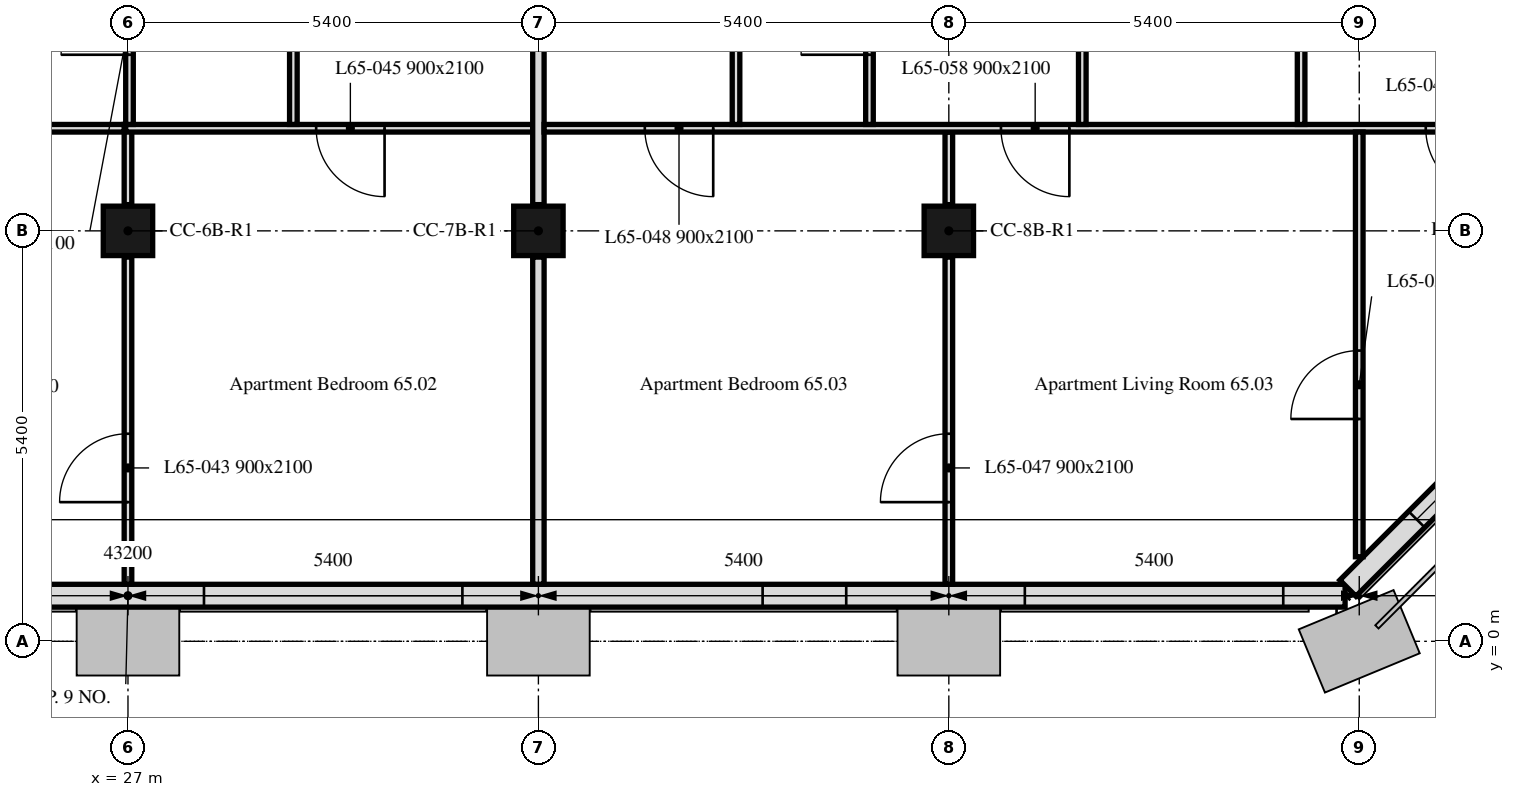
"""IFC4 building model, lengths in metres.
Left out: names, types, materials, properties, quantities, classifications, styles, units other than length and angle.
Written with IfcOpenShell. Run it as: python <this file> out.ifc"""

import sys

from ifc_helpers import new_model, si_unit, direction, frame, frame_2d, origin, origin_2d, place, context, subcontext, project, spatial, rectangle, extrude, element, fill, save


model = new_model("IFC4")
c1 = context("Model", 3, precision=1e-05, world=origin(), true_north=direction((0.0, 1.0)))
c2 = subcontext(c1, "Body", "Model", "MODEL_VIEW")
j1 = project(units=[si_unit("LENGTHUNIT", "METRE"), si_unit("PLANEANGLEUNIT", "RADIAN")], contexts=[c1])
p1 = place(None, origin())
s1 = spatial("IfcSite", under=j1, at=p1, CompositionType="ELEMENT")
p2 = place(p1, origin())
s2 = spatial("IfcBuilding", under=s1, at=p2, CompositionType="ELEMENT")
p3 = place(p2, frame((0.0, 0.0, 268.6)))
s3 = spatial("IfcBuildingStorey", under=s2, at=p3, CompositionType="ELEMENT", Elevation=268.6)
for number, where, z_axis, x_axis in (
    (1, (27.0, 5.4, 0.0), (0.0, 0.0, 1.0), (1.0, 0.0, 0.0)),
    (2, (32.4, 5.4, 0.0), (0.0, 0.0, 1.0), (1.0, 0.0, 0.0)),
    (3, (37.8, 5.4, 0.0), (0.0, 0.0, 1.0), (1.0, 0.0, 0.0)),
):
    element("IfcColumn", number, at=place(p3, frame(where, z_axis=z_axis, x_axis=x_axis)), inside=s3, PredefinedType="COLUMN", context=c2, shape_type="SweptSolid", body=[
        extrude(rectangle(XDim=0.65, YDim=0.65, at=origin_2d()), origin(), (0.0, 0.0, 1.0), 3.0),
    ])
p4 = place(p3, frame((10.986, 0.6, 0.0), z_axis=(0.0, 0.0, 1.0), x_axis=(1.0, 0.0, 0.0)))
e4 = element("IfcWall", 4, at=p4, inside=s3, PredefinedType="SOLIDWALL", context=c2, shape_type="SweptSolid", body=[
    extrude(rectangle(XDim=32.027, YDim=0.3, at=frame_2d((16.014, 0.0))), origin(), (0.0, 0.0, 1.0), 3.0),
])
p5 = place(p4, frame((2.764, 0.0, 0.9)))
e5 = element("IfcOpeningElement", 5, at=p5, cuts=e4, PredefinedType="OPENING", context=c2, shape_type="SweptSolid", body=[
    extrude(rectangle(XDim=1.1, YDim=1.7, at=frame_2d((0.55, 0.85))), frame((0.0, 0.16, 0.0), z_axis=(0.0, -1.0, 0.0), x_axis=(1.0, 0.0, 0.0)), (0.0, 0.0, 1.0), 0.32),
])
p6 = place(p4, frame((6.214, 0.0, 0.9)))
e6 = element("IfcOpeningElement", 6, at=p6, cuts=e4, PredefinedType="OPENING", context=c2, shape_type="SweptSolid", body=[
    extrude(rectangle(XDim=3.4, YDim=1.7, at=frame_2d((1.7, 0.85))), frame((0.0, 0.16, 0.0), z_axis=(0.0, -1.0, 0.0), x_axis=(1.0, 0.0, 0.0)), (0.0, 0.0, 1.0), 0.32),
])
p7 = place(p4, frame((13.564, 0.0, 0.9)))
e7 = element("IfcOpeningElement", 7, at=p7, cuts=e4, PredefinedType="OPENING", context=c2, shape_type="SweptSolid", body=[
    extrude(rectangle(XDim=1.1, YDim=1.7, at=frame_2d((0.55, 0.85))), frame((0.0, 0.16, 0.0), z_axis=(0.0, -1.0, 0.0), x_axis=(1.0, 0.0, 0.0)), (0.0, 0.0, 1.0), 0.32),
])
p8 = place(p4, frame((17.014, 0.0, 0.9)))
e8 = element("IfcOpeningElement", 8, at=p8, cuts=e4, PredefinedType="OPENING", context=c2, shape_type="SweptSolid", body=[
    extrude(rectangle(XDim=3.4, YDim=1.7, at=frame_2d((1.7, 0.85))), frame((0.0, 0.16, 0.0), z_axis=(0.0, -1.0, 0.0), x_axis=(1.0, 0.0, 0.0)), (0.0, 0.0, 1.0), 0.32),
])
p9 = place(p4, frame((24.364, 0.0, 0.9)))
e9 = element("IfcOpeningElement", 9, at=p9, cuts=e4, PredefinedType="OPENING", context=c2, shape_type="SweptSolid", body=[
    extrude(rectangle(XDim=1.1, YDim=1.7, at=frame_2d((0.55, 0.85))), frame((0.0, 0.16, 0.0), z_axis=(0.0, -1.0, 0.0), x_axis=(1.0, 0.0, 0.0)), (0.0, 0.0, 1.0), 0.32),
])
p10 = place(p4, frame((27.814, 0.0, 0.9)))
e10 = element("IfcOpeningElement", 10, at=p10, cuts=e4, PredefinedType="OPENING", context=c2, shape_type="SweptSolid", body=[
    extrude(rectangle(XDim=3.4, YDim=1.7, at=frame_2d((1.7, 0.85))), frame((0.0, 0.16, 0.0), z_axis=(0.0, -1.0, 0.0), x_axis=(1.0, 0.0, 0.0)), (0.0, 0.0, 1.0), 0.32),
])
p11 = place(p3, frame((43.051, 0.699, 0.0), z_axis=(0.0, 0.0, 1.0), x_axis=(0.707106781187, 0.707106781187, 0.0)))
e11 = element("IfcWall", 11, at=p11, inside=s3, PredefinedType="SOLIDWALL", context=c2, shape_type="SweptSolid", body=[
    extrude(rectangle(XDim=6.86, YDim=0.3, at=frame_2d((3.43, 0.0))), origin(), (0.0, 0.0, 1.0), 3.0),
])
p12 = place(p11, frame((1.28, 0.0, 0.9)))
e12 = element("IfcOpeningElement", 12, at=p12, cuts=e11, PredefinedType="OPENING", context=c2, shape_type="SweptSolid", body=[
    extrude(rectangle(XDim=1.1, YDim=1.7, at=frame_2d((0.55, 0.85))), frame((0.0, 0.16, 0.0), z_axis=(0.0, -1.0, 0.0), x_axis=(1.0, 0.0, 0.0)), (0.0, 0.0, 1.0), 0.32),
])
p13 = place(p11, frame((4.48, 0.0, 0.9)))
e13 = element("IfcOpeningElement", 13, at=p13, cuts=e11, PredefinedType="OPENING", context=c2, shape_type="SweptSolid", body=[
    extrude(rectangle(XDim=1.1, YDim=1.7, at=frame_2d((0.55, 0.85))), frame((0.0, 0.16, 0.0), z_axis=(0.0, -1.0, 0.0), x_axis=(1.0, 0.0, 0.0)), (0.0, 0.0, 1.0), 0.32),
])
p14 = place(p3, frame((27.0, 0.751, 0.0), z_axis=(0.0, 0.0, 1.0), x_axis=(0.0, 1.0, 0.0)))
e14 = element("IfcWall", 14, at=p14, inside=s3, PredefinedType="PARTITIONING", context=c2, shape_type="SweptSolid", body=[
    extrude(rectangle(XDim=4.304, YDim=0.1, at=frame_2d((2.152, 0.0))), origin(), (0.0, 0.0, 1.0), 2.4),
])
p15 = place(p14, frame((1.08, 0.0, 0.0)))
e15 = element("IfcOpeningElement", 15, at=p15, cuts=e14, PredefinedType="OPENING", context=c2, shape_type="SweptSolid", body=[
    extrude(rectangle(XDim=0.9, YDim=2.1, at=frame_2d((0.45, 1.05))), frame((0.0, 0.05, 0.0), z_axis=(0.0, -1.0, 0.0), x_axis=(1.0, 0.0, 0.0)), (0.0, 0.0, 1.0), 0.1),
])
p16 = place(p3, frame((27.0, 5.745, 0.0), z_axis=(0.0, 0.0, 1.0), x_axis=(0.0, 1.0, 0.0)))
e16 = element("IfcWall", 16, at=p16, inside=s3, PredefinedType="PARTITIONING", context=c2, shape_type="SweptSolid", body=[
    extrude(rectangle(XDim=1.055, YDim=0.1, at=frame_2d((0.527, 0.0))), origin(), (0.0, 0.0, 1.0), 2.4),
])
p17 = place(p3, frame((26.95, 6.75, 0.0), z_axis=(0.0, 0.0, 1.0), x_axis=(-1.0, 0.0, 0.0)))
e17 = element("IfcWall", 17, at=p17, inside=s3, PredefinedType="PARTITIONING", context=c2, shape_type="SweptSolid", body=[
    extrude(rectangle(XDim=5.275, YDim=0.1, at=frame_2d((2.637, 0.0))), origin(), (0.0, 0.0, 1.0), 3.0),
])
p18 = place(p17, frame((2.88, 0.0, 0.0)))
e18 = element("IfcOpeningElement", 18, at=p18, cuts=e17, PredefinedType="OPENING", context=c2, shape_type="SweptSolid", body=[
    extrude(rectangle(XDim=0.9, YDim=2.1, at=frame_2d((0.45, 1.05))), frame((0.0, 0.05, 0.0), z_axis=(0.0, -1.0, 0.0), x_axis=(1.0, 0.0, 0.0)), (0.0, 0.0, 1.0), 0.1),
])
p19 = place(p17, frame((1.38, 0.0, 0.0)))
e19 = element("IfcOpeningElement", 19, at=p19, cuts=e17, PredefinedType="OPENING", context=c2, shape_type="SweptSolid", body=[
    extrude(rectangle(XDim=0.9, YDim=2.1, at=frame_2d((0.45, 1.05))), frame((0.0, 0.05, 0.0), z_axis=(0.0, -1.0, 0.0), x_axis=(1.0, 0.0, 0.0)), (0.0, 0.0, 1.0), 0.1),
])
p20 = place(p3, frame((32.4, 0.751, 0.0), z_axis=(0.0, 0.0, 1.0), x_axis=(0.0, 1.0, 0.0)))
e20 = element("IfcWall", 20, at=p20, inside=s3, PredefinedType="PARTITIONING", context=c2, shape_type="SweptSolid", body=[
    extrude(rectangle(XDim=4.304, YDim=0.15, at=frame_2d((2.152, 0.0))), origin(), (0.0, 0.0, 1.0), 2.4),
])
p21 = place(p3, frame((32.325, 6.75, 0.0), z_axis=(0.0, 0.0, 1.0), x_axis=(-1.0, 0.0, 0.0)))
e21 = element("IfcWall", 21, at=p21, inside=s3, PredefinedType="PARTITIONING", context=c2, shape_type="SweptSolid", body=[
    extrude(rectangle(XDim=5.355, YDim=0.1, at=frame_2d((2.677, 0.0))), origin(), (0.0, 0.0, 1.0), 3.0),
])
p22 = place(p21, frame((1.949, 0.0, 0.0)))
e22 = element("IfcOpeningElement", 22, at=p22, cuts=e21, PredefinedType="OPENING", context=c2, shape_type="SweptSolid", body=[
    extrude(rectangle(XDim=0.9, YDim=2.1, at=frame_2d((0.45, 1.05))), frame((0.0, 0.05, 0.0), z_axis=(0.0, -1.0, 0.0), x_axis=(1.0, 0.0, 0.0)), (0.0, 0.0, 1.0), 0.1),
])
p23 = place(p3, frame((27.02, 6.8, 0.0), z_axis=(0.0, 0.0, 1.0), x_axis=(0.0, 1.0, 0.0)))
e23 = element("IfcWall", 23, at=p23, inside=s3, PredefinedType="PARTITIONING", context=c2, shape_type="SweptSolid", body=[
    extrude(rectangle(XDim=3.655, YDim=0.1, at=frame_2d((1.828, 0.0))), origin(), (0.0, 0.0, 1.0), 2.4),
])
p24 = place(p23, frame((0.917, 0.0, 0.0)))
e24 = element("IfcOpeningElement", 24, at=p24, cuts=e23, PredefinedType="OPENING", context=c2, shape_type="SweptSolid", body=[
    extrude(rectangle(XDim=0.9, YDim=2.1, at=frame_2d((0.45, 1.05))), frame((0.0, 0.05, 0.0), z_axis=(0.0, -1.0, 0.0), x_axis=(1.0, 0.0, 0.0)), (0.0, 0.0, 1.0), 0.1),
])
p25 = place(p3, frame((29.176, 6.8, 0.0), z_axis=(0.0, 0.0, 1.0), x_axis=(0.0, 1.0, 0.0)))
e25 = element("IfcWall", 25, at=p25, inside=s3, PredefinedType="PARTITIONING", context=c2, shape_type="SweptSolid", body=[
    extrude(rectangle(XDim=7.075, YDim=0.1, at=frame_2d((3.538, 0.0))), origin(), (0.0, 0.0, 1.0), 3.0),
])
p26 = place(p3, frame((32.4, 5.745, 0.0), z_axis=(0.0, 0.0, 1.0), x_axis=(0.0, 1.0, 0.0)))
e26 = element("IfcWall", 26, at=p26, inside=s3, PredefinedType="PARTITIONING", context=c2, shape_type="SweptSolid", body=[
    extrude(rectangle(XDim=4.71, YDim=0.15, at=frame_2d((2.355, 0.0))), origin(), (0.0, 0.0, 1.0), 2.4),
])
p27 = place(p3, frame((37.8, 0.751, 0.0), z_axis=(0.0, 0.0, 1.0), x_axis=(0.0, 1.0, 0.0)))
e27 = element("IfcWall", 27, at=p27, inside=s3, PredefinedType="PARTITIONING", context=c2, shape_type="SweptSolid", body=[
    extrude(rectangle(XDim=4.304, YDim=0.1, at=frame_2d((2.152, 0.0))), origin(), (0.0, 0.0, 1.0), 2.4),
])
p28 = place(p27, frame((1.08, 0.0, 0.0)))
e28 = element("IfcOpeningElement", 28, at=p28, cuts=e27, PredefinedType="OPENING", context=c2, shape_type="SweptSolid", body=[
    extrude(rectangle(XDim=0.9, YDim=2.1, at=frame_2d((0.45, 1.05))), frame((0.0, 0.05, 0.0), z_axis=(0.0, -1.0, 0.0), x_axis=(1.0, 0.0, 0.0)), (0.0, 0.0, 1.0), 0.1),
])
p29 = place(p3, frame((37.8, 5.745, 0.0), z_axis=(0.0, 0.0, 1.0), x_axis=(0.0, 1.0, 0.0)))
e29 = element("IfcWall", 29, at=p29, inside=s3, PredefinedType="PARTITIONING", context=c2, shape_type="SweptSolid", body=[
    extrude(rectangle(XDim=0.955, YDim=0.1, at=frame_2d((0.478, 0.0))), origin(), (0.0, 0.0, 1.0), 2.4),
])
p30 = place(p3, frame((47.849, 6.75, 0.0), z_axis=(0.0, 0.0, 1.0), x_axis=(-1.0, 0.0, 0.0)))
e30 = element("IfcWall", 30, at=p30, inside=s3, PredefinedType="PARTITIONING", context=c2, shape_type="SweptSolid", body=[
    extrude(rectangle(XDim=15.374, YDim=0.1, at=frame_2d((7.687, 0.0))), origin(), (0.0, 0.0, 1.0), 2.4),
])
p31 = place(p30, frame((0.929, 0.0, 0.0)))
e31 = element("IfcOpeningElement", 31, at=p31, cuts=e30, PredefinedType="OPENING", context=c2, shape_type="SweptSolid", body=[
    extrude(rectangle(XDim=0.9, YDim=2.1, at=frame_2d((0.45, 1.05))), frame((0.0, 0.05, 0.0), z_axis=(0.0, -1.0, 0.0), x_axis=(1.0, 0.0, 0.0)), (0.0, 0.0, 1.0), 0.1),
])
p32 = place(p30, frame((13.149, 0.0, 0.0)))
e32 = element("IfcOpeningElement", 32, at=p32, cuts=e30, PredefinedType="OPENING", context=c2, shape_type="SweptSolid", body=[
    extrude(rectangle(XDim=0.9, YDim=2.1, at=frame_2d((0.45, 1.05))), frame((0.0, 0.05, 0.0), z_axis=(0.0, -1.0, 0.0), x_axis=(1.0, 0.0, 0.0)), (0.0, 0.0, 1.0), 0.1),
])
p33 = place(p30, frame((2.874, 0.0, 0.0)))
e33 = element("IfcOpeningElement", 33, at=p33, cuts=e30, PredefinedType="OPENING", context=c2, shape_type="SweptSolid", body=[
    extrude(rectangle(XDim=0.9, YDim=2.1, at=frame_2d((0.45, 1.05))), frame((0.0, 0.05, 0.0), z_axis=(0.0, -1.0, 0.0), x_axis=(1.0, 0.0, 0.0)), (0.0, 0.0, 1.0), 0.1),
])
p34 = place(p30, frame((8.463, 0.0, 0.0)))
e34 = element("IfcOpeningElement", 34, at=p34, cuts=e30, PredefinedType="OPENING", context=c2, shape_type="SweptSolid", body=[
    extrude(rectangle(XDim=0.9, YDim=2.1, at=frame_2d((0.45, 1.05))), frame((0.0, 0.05, 0.0), z_axis=(0.0, -1.0, 0.0), x_axis=(1.0, 0.0, 0.0)), (0.0, 0.0, 1.0), 0.1),
])
p35 = place(p3, frame((43.2, 1.112, 0.0), z_axis=(0.0, 0.0, 1.0), x_axis=(0.0, 1.0, 0.0)))
e35 = element("IfcWall", 35, at=p35, inside=s3, PredefinedType="PARTITIONING", context=c2, shape_type="SweptSolid", body=[
    extrude(rectangle(XDim=5.588, YDim=0.1, at=frame_2d((2.794, 0.0))), origin(), (0.0, 0.0, 1.0), 3.0),
])
p36 = place(p35, frame((1.813, 0.0, 0.0)))
e36 = element("IfcOpeningElement", 36, at=p36, cuts=e35, PredefinedType="OPENING", context=c2, shape_type="SweptSolid", body=[
    extrude(rectangle(XDim=0.9, YDim=2.1, at=frame_2d((0.45, 1.05))), frame((0.0, 0.05, 0.0), z_axis=(0.0, -1.0, 0.0), x_axis=(1.0, 0.0, 0.0)), (0.0, 0.0, 1.0), 0.1),
])
p37 = place(p3, frame((35.0, 6.8, 0.0), z_axis=(0.0, 0.0, 1.0), x_axis=(0.0, 1.0, 0.0)))
e37 = element("IfcWall", 37, at=p37, inside=s3, PredefinedType="PARTITIONING", context=c2, shape_type="SweptSolid", body=[
    extrude(rectangle(XDim=7.075, YDim=0.1, at=frame_2d((3.538, 0.0))), origin(), (0.0, 0.0, 1.0), 2.4),
])
p38 = place(p3, frame((36.756, 6.8, 0.0), z_axis=(0.0, 0.0, 1.0), x_axis=(0.0, 1.0, 0.0)))
e38 = element("IfcWall", 38, at=p38, inside=s3, PredefinedType="PARTITIONING", context=c2, shape_type="SweptSolid", body=[
    extrude(rectangle(XDim=7.075, YDim=0.1, at=frame_2d((3.538, 0.0))), origin(), (0.0, 0.0, 1.0), 2.4),
])
p39 = place(p38, frame((0.917, 0.0, 0.0)))
e39 = element("IfcOpeningElement", 39, at=p39, cuts=e38, PredefinedType="OPENING", context=c2, shape_type="SweptSolid", body=[
    extrude(rectangle(XDim=0.9, YDim=2.1, at=frame_2d((0.45, 1.05))), frame((0.0, 0.05, 0.0), z_axis=(0.0, -1.0, 0.0), x_axis=(1.0, 0.0, 0.0)), (0.0, 0.0, 1.0), 0.1),
])
p40 = place(p38, frame((5.925, 0.0, 0.0)))
e40 = element("IfcOpeningElement", 40, at=p40, cuts=e38, PredefinedType="OPENING", context=c2, shape_type="SweptSolid", body=[
    extrude(rectangle(XDim=0.9, YDim=2.1, at=frame_2d((0.45, 1.05))), frame((0.0, 0.05, 0.0), z_axis=(0.0, -1.0, 0.0), x_axis=(1.0, 0.0, 0.0)), (0.0, 0.0, 1.0), 0.1),
])
p41 = place(p3, frame((39.556, 6.8, 0.0), z_axis=(0.0, 0.0, 1.0), x_axis=(0.0, 1.0, 0.0)))
e41 = element("IfcWall", 41, at=p41, inside=s3, PredefinedType="PARTITIONING", context=c2, shape_type="SweptSolid", body=[
    extrude(rectangle(XDim=7.075, YDim=0.1, at=frame_2d((3.538, 0.0))), origin(), (0.0, 0.0, 1.0), 2.4),
])
p42 = place(p41, frame((1.05, 0.0, 0.0)))
e42 = element("IfcOpeningElement", 42, at=p42, cuts=e41, PredefinedType="OPENING", context=c2, shape_type="SweptSolid", body=[
    extrude(rectangle(XDim=0.9, YDim=2.1, at=frame_2d((0.45, 1.05))), frame((0.0, 0.05, 0.0), z_axis=(0.0, -1.0, 0.0), x_axis=(1.0, 0.0, 0.0)), (0.0, 0.0, 1.0), 0.1),
])
p43 = place(p41, frame((5.925, 0.0, 0.0)))
e43 = element("IfcOpeningElement", 43, at=p43, cuts=e41, PredefinedType="OPENING", context=c2, shape_type="SweptSolid", body=[
    extrude(rectangle(XDim=0.9, YDim=2.1, at=frame_2d((0.45, 1.05))), frame((0.0, 0.05, 0.0), z_axis=(0.0, -1.0, 0.0), x_axis=(1.0, 0.0, 0.0)), (0.0, 0.0, 1.0), 0.1),
])
p44 = place(p3, frame((42.435, 6.8, 0.0), z_axis=(0.0, 0.0, 1.0), x_axis=(0.0, 1.0, 0.0)))
e44 = element("IfcWall", 44, at=p44, inside=s3, PredefinedType="PARTITIONING", context=c2, shape_type="SweptSolid", body=[
    extrude(rectangle(XDim=7.075, YDim=0.1, at=frame_2d((3.538, 0.0))), origin(), (0.0, 0.0, 1.0), 2.4),
])
p45 = place(p8, origin())
e45 = element("IfcWindow", 45, at=p45, inside=s3, PartitioningType="SINGLE_PANEL", PredefinedType="WINDOW", context=c2, shape_type="SweptSolid", body=[
    extrude(rectangle(XDim=3.4, YDim=1.7, at=frame_2d((1.7, 0.85))), frame((0.0, 0.03, 0.0), z_axis=(0.0, -1.0, 0.0), x_axis=(1.0, 0.0, 0.0)), (0.0, 0.0, 1.0), 0.06),
])
fill(e8, e45)
p46 = place(p9, origin())
e46 = element("IfcWindow", 46, at=p46, inside=s3, PartitioningType="SINGLE_PANEL", PredefinedType="WINDOW", context=c2, shape_type="SweptSolid", body=[
    extrude(rectangle(XDim=1.1, YDim=1.7, at=frame_2d((0.55, 0.85))), frame((0.0, 0.03, 0.0), z_axis=(0.0, -1.0, 0.0), x_axis=(1.0, 0.0, 0.0)), (0.0, 0.0, 1.0), 0.06),
])
fill(e9, e46)
p47 = place(p10, origin())
e47 = element("IfcWindow", 47, at=p47, inside=s3, PartitioningType="SINGLE_PANEL", PredefinedType="WINDOW", context=c2, shape_type="SweptSolid", body=[
    extrude(rectangle(XDim=3.4, YDim=1.7, at=frame_2d((1.7, 0.85))), frame((0.0, 0.03, 0.0), z_axis=(0.0, -1.0, 0.0), x_axis=(1.0, 0.0, 0.0)), (0.0, 0.0, 1.0), 0.06),
])
fill(e10, e47)
p48 = place(p12, origin())
e48 = element("IfcWindow", 48, at=p48, inside=s3, PartitioningType="SINGLE_PANEL", PredefinedType="WINDOW", context=c2, shape_type="SweptSolid", body=[
    extrude(rectangle(XDim=1.1, YDim=1.7, at=frame_2d((0.55, 0.85))), frame((0.0, 0.03, 0.0), z_axis=(0.0, -1.0, 0.0), x_axis=(1.0, 0.0, 0.0)), (0.0, 0.0, 1.0), 0.06),
])
fill(e12, e48)
p49 = place(p24, origin())
e49 = element("IfcDoor", 49, at=p49, inside=s3, OperationType="SINGLE_SWING_LEFT", PredefinedType="DOOR", context=c2, shape_type="SweptSolid", body=[
    extrude(rectangle(XDim=0.9, YDim=2.1, at=frame_2d((0.45, 1.05))), frame((0.0, 0.025, 0.0), z_axis=(0.0, -1.0, 0.0), x_axis=(1.0, 0.0, 0.0)), (0.0, 0.0, 1.0), 0.05),
])
fill(e24, e49)
p50 = place(p39, origin())
e50 = element("IfcDoor", 50, at=p50, inside=s3, OperationType="SINGLE_SWING_RIGHT", PredefinedType="DOOR", context=c2, shape_type="SweptSolid", body=[
    extrude(rectangle(XDim=0.9, YDim=2.1, at=frame_2d((0.45, 1.05))), frame((0.0, 0.025, 0.0), z_axis=(0.0, -1.0, 0.0), x_axis=(1.0, 0.0, 0.0)), (0.0, 0.0, 1.0), 0.05),
])
fill(e39, e50)
p51 = place(p15, origin())
e51 = element("IfcDoor", 51, at=p51, inside=s3, OperationType="SINGLE_SWING_LEFT", PredefinedType="DOOR", context=c2, shape_type="SweptSolid", body=[
    extrude(rectangle(XDim=0.9, YDim=2.1, at=frame_2d((0.45, 1.05))), frame((0.0, 0.025, 0.0), z_axis=(0.0, -1.0, 0.0), x_axis=(1.0, 0.0, 0.0)), (0.0, 0.0, 1.0), 0.05),
])
fill(e15, e51)
p52 = place(p22, origin())
e52 = element("IfcDoor", 52, at=p52, inside=s3, OperationType="SINGLE_SWING_RIGHT", PredefinedType="DOOR", context=c2, shape_type="SweptSolid", body=[
    extrude(rectangle(XDim=0.9, YDim=2.1, at=frame_2d((0.45, 1.05))), frame((0.0, 0.025, 0.0), z_axis=(0.0, -1.0, 0.0), x_axis=(1.0, 0.0, 0.0)), (0.0, 0.0, 1.0), 0.05),
])
fill(e22, e52)
p53 = place(p28, origin())
e53 = element("IfcDoor", 53, at=p53, inside=s3, OperationType="SINGLE_SWING_LEFT", PredefinedType="DOOR", context=c2, shape_type="SweptSolid", body=[
    extrude(rectangle(XDim=0.9, YDim=2.1, at=frame_2d((0.45, 1.05))), frame((0.0, 0.025, 0.0), z_axis=(0.0, -1.0, 0.0), x_axis=(1.0, 0.0, 0.0)), (0.0, 0.0, 1.0), 0.05),
])
fill(e28, e53)
p54 = place(p32, origin())
e54 = element("IfcDoor", 54, at=p54, inside=s3, OperationType="SINGLE_SWING_RIGHT", PredefinedType="DOOR", context=c2, shape_type="SweptSolid", body=[
    extrude(rectangle(XDim=0.9, YDim=2.1, at=frame_2d((0.45, 1.05))), frame((0.0, 0.025, 0.0), z_axis=(0.0, -1.0, 0.0), x_axis=(1.0, 0.0, 0.0)), (0.0, 0.0, 1.0), 0.05),
])
fill(e32, e54)
p55 = place(p33, origin())
e55 = element("IfcDoor", 55, at=p55, inside=s3, OperationType="SINGLE_SWING_LEFT", PredefinedType="DOOR", context=c2, shape_type="SweptSolid", body=[
    extrude(rectangle(XDim=0.9, YDim=2.1, at=frame_2d((0.45, 1.05))), frame((0.0, 0.025, 0.0), z_axis=(0.0, -1.0, 0.0), x_axis=(1.0, 0.0, 0.0)), (0.0, 0.0, 1.0), 0.05),
])
fill(e33, e55)
p56 = place(p36, origin())
e56 = element("IfcDoor", 56, at=p56, inside=s3, OperationType="SINGLE_SWING_RIGHT", PredefinedType="DOOR", context=c2, shape_type="SweptSolid", body=[
    extrude(rectangle(XDim=0.9, YDim=2.1, at=frame_2d((0.45, 1.05))), frame((0.0, 0.025, 0.0), z_axis=(0.0, -1.0, 0.0), x_axis=(1.0, 0.0, 0.0)), (0.0, 0.0, 1.0), 0.05),
])
fill(e36, e56)
p57 = place(p34, origin())
e57 = element("IfcDoor", 57, at=p57, inside=s3, OperationType="SINGLE_SWING_RIGHT", PredefinedType="DOOR", context=c2, shape_type="SweptSolid", body=[
    extrude(rectangle(XDim=0.9, YDim=2.1, at=frame_2d((0.45, 1.05))), frame((0.0, 0.025, 0.0), z_axis=(0.0, -1.0, 0.0), x_axis=(1.0, 0.0, 0.0)), (0.0, 0.0, 1.0), 0.05),
])
fill(e34, e57)
save(model, sys.argv[1])
